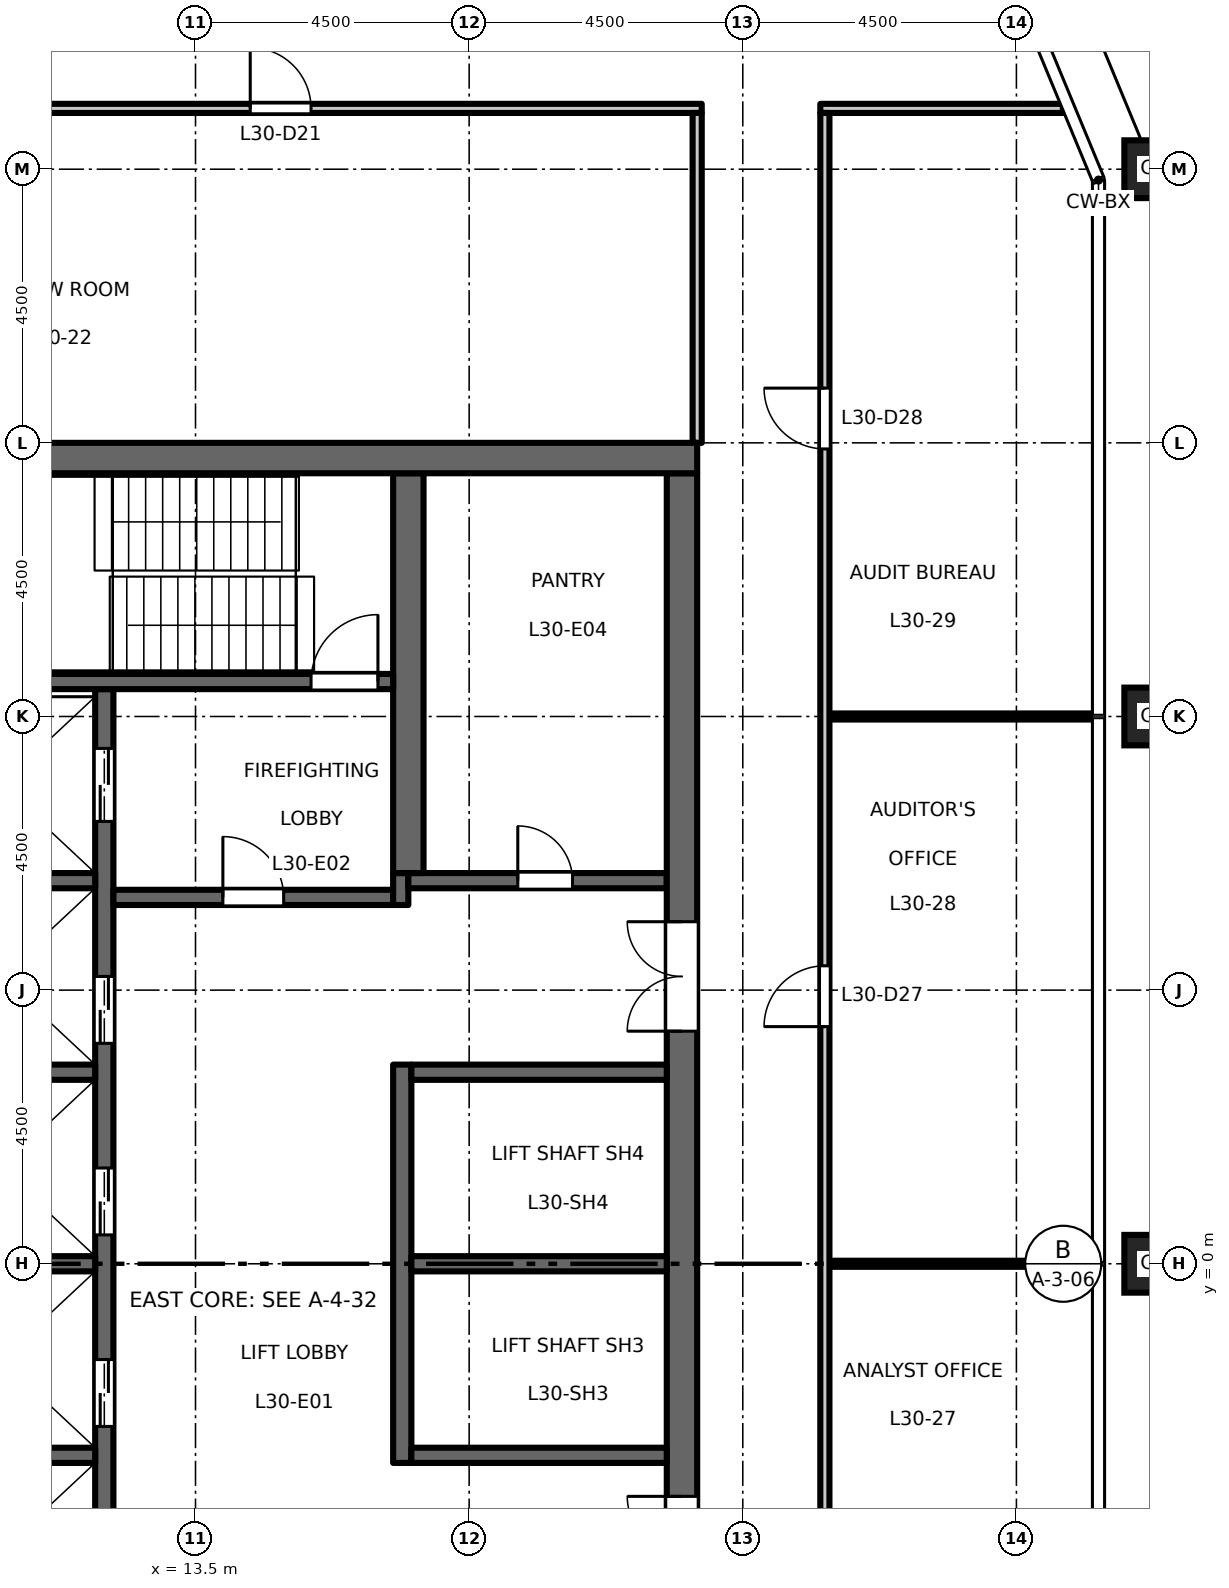
"""IFC4 building model, lengths in metres.
Left out: names, types, materials, properties, quantities, classifications, styles, units other than length and angle.
Written with IfcOpenShell. Run it as: python <this file> out.ifc"""

import sys

from ifc_helpers import new_model, si_unit, direction, frame, frame_2d, origin, origin_2d, place, context, subcontext, project, spatial, rectangle, hollow_rectangle, extrude, element, fill, save


model = new_model("IFC4")
c1 = context("Model", 3, precision=1e-05, world=origin(), true_north=direction((0.0, 1.0)))
c2 = subcontext(c1, "Body", "Model", "MODEL_VIEW")
j1 = project(units=[si_unit("LENGTHUNIT", "METRE"), si_unit("PLANEANGLEUNIT", "RADIAN")], contexts=[c1])
p1 = place(None, origin())
s1 = spatial("IfcSite", under=j1, at=p1, CompositionType="ELEMENT")
p2 = place(p1, origin())
s2 = spatial("IfcBuilding", under=s1, at=p2, CompositionType="ELEMENT")
p3 = place(p2, frame((0.0, 0.0, 140.7)))
s3 = spatial("IfcBuildingStorey", under=s2, at=p3, CompositionType="ELEMENT", Elevation=140.7)
for number, where, z_axis, x_axis in (
    (1, (29.25, 0.0, 0.0), (0.0, 0.0, 1.0), (1.0, 0.0, 0.0)),
    (2, (29.25, 9.0, 0.0), (0.0, 0.0, 1.0), (1.0, 0.0, 0.0)),
    (3, (29.25, 18.0, 0.0), (0.0, 0.0, 1.0), (1.0, 0.0, 0.0)),
):
    element("IfcColumn", number, at=place(p3, frame(where, z_axis=z_axis, x_axis=x_axis)), inside=s3, PredefinedType="COLUMN", context=c2, shape_type="SweptSolid", body=[
        extrude(hollow_rectangle(XDim=0.95, YDim=0.95, WallThickness=0.055, at=origin_2d()), origin(), (0.0, 0.0, 1.0), 4.5),
    ])
p4 = place(p3, frame((12.0, -9.45, 0.0), z_axis=(0.0, 0.0, 1.0), x_axis=(0.0, 1.0, 0.0)))
e4 = element("IfcWall", 4, at=p4, inside=s3, PredefinedType="SHEAR", context=c2, shape_type="SweptSolid", body=[
    extrude(rectangle(XDim=18.9, YDim=0.3, at=frame_2d((9.45, 0.0))), origin(), (0.0, 0.0, 1.0), 4.35),
])
p5 = place(p4, frame((3.625, 0.0, 0.0)))
e5 = element("IfcOpeningElement", 5, at=p5, cuts=e4, PredefinedType="OPENING", context=c2, shape_type="SweptSolid", body=[
    extrude(rectangle(XDim=1.1, YDim=2.1, at=frame_2d((0.55, 1.05))), frame((0.0, 0.16, 0.0), z_axis=(0.0, -1.0, 0.0), x_axis=(1.0, 0.0, 0.0)), (0.0, 0.0, 1.0), 0.32),
])
p6 = place(p4, frame((6.775, 0.0, 0.0)))
e6 = element("IfcOpeningElement", 6, at=p6, cuts=e4, PredefinedType="OPENING", context=c2, shape_type="SweptSolid", body=[
    extrude(rectangle(XDim=1.1, YDim=2.1, at=frame_2d((0.55, 1.05))), frame((0.0, 0.16, 0.0), z_axis=(0.0, -1.0, 0.0), x_axis=(1.0, 0.0, 0.0)), (0.0, 0.0, 1.0), 0.32),
])
p7 = place(p4, frame((9.925, 0.0, 0.0)))
e7 = element("IfcOpeningElement", 7, at=p7, cuts=e4, PredefinedType="OPENING", context=c2, shape_type="SweptSolid", body=[
    extrude(rectangle(XDim=1.1, YDim=2.1, at=frame_2d((0.55, 1.05))), frame((0.0, 0.16, 0.0), z_axis=(0.0, -1.0, 0.0), x_axis=(1.0, 0.0, 0.0)), (0.0, 0.0, 1.0), 0.32),
])
p8 = place(p4, frame((13.075, 0.0, 0.0)))
e8 = element("IfcOpeningElement", 8, at=p8, cuts=e4, PredefinedType="OPENING", context=c2, shape_type="SweptSolid", body=[
    extrude(rectangle(XDim=1.1, YDim=2.1, at=frame_2d((0.55, 1.05))), frame((0.0, 0.16, 0.0), z_axis=(0.0, -1.0, 0.0), x_axis=(1.0, 0.0, 0.0)), (0.0, 0.0, 1.0), 0.32),
])
p9 = place(p4, frame((16.725, 0.0, 0.0)))
e9 = element("IfcOpeningElement", 9, at=p9, cuts=e4, PredefinedType="OPENING", context=c2, shape_type="SweptSolid", body=[
    extrude(rectangle(XDim=1.2, YDim=2.1, at=frame_2d((0.6, 1.05))), frame((0.0, 0.16, 0.0), z_axis=(0.0, -1.0, 0.0), x_axis=(1.0, 0.0, 0.0)), (0.0, 0.0, 1.0), 0.32),
])
p10 = place(p4, frame((0.975, 0.0, 0.0)))
e10 = element("IfcOpeningElement", 10, at=p10, cuts=e4, PredefinedType="OPENING", context=c2, shape_type="SweptSolid", body=[
    extrude(rectangle(XDim=1.2, YDim=2.1, at=frame_2d((0.6, 1.05))), frame((0.0, 0.16, 0.0), z_axis=(0.0, -1.0, 0.0), x_axis=(1.0, 0.0, 0.0)), (0.0, 0.0, 1.0), 0.32),
])
p11 = place(p3, frame((12.15, 6.025, 0.0), z_axis=(0.0, 0.0, 1.0), x_axis=(1.0, 0.0, 0.0)))
e11 = element("IfcWall", 11, at=p11, inside=s3, PredefinedType="SHEAR", context=c2, shape_type="SweptSolid", body=[
    extrude(rectangle(XDim=4.6, YDim=0.25, at=frame_2d((2.3, 0.0))), origin(), (0.0, 0.0, 1.0), 4.35),
])
p12 = place(p11, frame((1.8, 0.0, 0.0)))
e12 = element("IfcOpeningElement", 12, at=p12, cuts=e11, PredefinedType="OPENING", context=c2, shape_type="SweptSolid", body=[
    extrude(rectangle(XDim=1.0, YDim=2.1, at=frame_2d((0.5, 1.05))), frame((0.0, 0.135, 0.0), z_axis=(0.0, -1.0, 0.0), x_axis=(1.0, 0.0, 0.0)), (0.0, 0.0, 1.0), 0.27),
])
p13 = place(p3, frame((16.875, 5.9, 0.0), z_axis=(0.0, 0.0, 1.0), x_axis=(0.0, 1.0, 0.0)))
e13 = element("IfcWall", 13, at=p13, inside=s3, PredefinedType="SHEAR", context=c2, shape_type="SweptSolid", body=[
    extrude(rectangle(XDim=0.525, YDim=0.25, at=frame_2d((0.263, 0.0))), origin(), (0.0, 0.0, 1.0), 4.35),
])
p14 = place(p3, frame((17.0, 6.3, 0.0), z_axis=(0.0, 0.0, 1.0), x_axis=(1.0, 0.0, 0.0)))
e14 = element("IfcWall", 14, at=p14, inside=s3, PredefinedType="SHEAR", context=c2, shape_type="SweptSolid", body=[
    extrude(rectangle(XDim=4.25, YDim=0.25, at=frame_2d((2.125, 0.0))), origin(), (0.0, 0.0, 1.0), 4.35),
])
p15 = place(p14, frame((1.8, 0.0, 0.0)))
e15 = element("IfcOpeningElement", 15, at=p15, cuts=e14, PredefinedType="OPENING", context=c2, shape_type="SweptSolid", body=[
    extrude(rectangle(XDim=0.9, YDim=2.1, at=frame_2d((0.45, 1.05))), frame((0.0, 0.135, 0.0), z_axis=(0.0, -1.0, 0.0), x_axis=(1.0, 0.0, 0.0)), (0.0, 0.0, 1.0), 0.27),
])
p16 = place(p3, frame((21.5, -13.0, 0.0), z_axis=(0.0, 0.0, 1.0), x_axis=(0.0, 1.0, 0.0)))
e16 = element("IfcWall", 16, at=p16, inside=s3, PredefinedType="SHEAR", context=c2, shape_type="SweptSolid", body=[
    extrude(rectangle(XDim=26.0, YDim=0.5, at=frame_2d((13.0, 0.0))), origin(), (0.0, 0.0, 1.0), 4.35),
])
p17 = place(p16, frame((16.825, 0.0, 0.0)))
e17 = element("IfcOpeningElement", 17, at=p17, cuts=e16, PredefinedType="OPENING", context=c2, shape_type="SweptSolid", body=[
    extrude(rectangle(XDim=1.8, YDim=2.1, at=frame_2d((0.9, 1.05))), frame((0.0, 0.26, 0.0), z_axis=(0.0, -1.0, 0.0), x_axis=(1.0, 0.0, 0.0)), (0.0, 0.0, 1.0), 0.52),
])
p18 = place(p16, frame((7.375, 0.0, 0.0)))
e18 = element("IfcOpeningElement", 18, at=p18, cuts=e16, PredefinedType="OPENING", context=c2, shape_type="SweptSolid", body=[
    extrude(rectangle(XDim=1.8, YDim=2.1, at=frame_2d((0.9, 1.05))), frame((0.0, 0.26, 0.0), z_axis=(0.0, -1.0, 0.0), x_axis=(1.0, 0.0, 0.0)), (0.0, 0.0, 1.0), 0.52),
])
p19 = place(p16, frame((2.65, 0.0, 0.0)))
e19 = element("IfcOpeningElement", 19, at=p19, cuts=e16, PredefinedType="OPENING", context=c2, shape_type="SweptSolid", body=[
    extrude(rectangle(XDim=0.9, YDim=2.1, at=frame_2d((0.45, 1.05))), frame((0.0, 0.26, 0.0), z_axis=(0.0, -1.0, 0.0), x_axis=(1.0, 0.0, 0.0)), (0.0, 0.0, 1.0), 0.52),
])
p20 = place(p3, frame((16.9, -3.275, 0.0), z_axis=(0.0, 0.0, 1.0), x_axis=(0.0, 1.0, 0.0)))
e20 = element("IfcWall", 20, at=p20, inside=s3, PredefinedType="SHEAR", context=c2, shape_type="SweptSolid", body=[
    extrude(rectangle(XDim=6.55, YDim=0.3, at=frame_2d((3.275, 0.0))), origin(), (0.0, 0.0, 1.0), 4.35),
])
for number, where, z_axis, x_axis in (
    (21, (17.05, 0.0, 0.0), (0.0, 0.0, 1.0), (1.0, 0.0, 0.0)),
    (22, (17.05, 3.15, 0.0), (0.0, 0.0, 1.0), (1.0, 0.0, 0.0)),
    (23, (17.05, -3.15, 0.0), (0.0, 0.0, 1.0), (1.0, 0.0, 0.0)),
):
    element("IfcWall", number, at=place(p3, frame(where, z_axis=z_axis, x_axis=x_axis)), inside=s3, PredefinedType="SHEAR", context=c2, shape_type="SweptSolid", body=[
        extrude(rectangle(XDim=4.2, YDim=0.25, at=frame_2d((2.1, 0.0))), origin(), (0.0, 0.0, 1.0), 4.35),
    ])
p21 = place(p3, frame((17.0, 6.425, 0.0), z_axis=(0.0, 0.0, 1.0), x_axis=(0.0, 1.0, 0.0)))
e24 = element("IfcWall", 24, at=p21, inside=s3, PredefinedType="SHEAR", context=c2, shape_type="SweptSolid", body=[
    extrude(rectangle(XDim=6.575, YDim=0.5, at=frame_2d((3.288, 0.0))), origin(), (0.0, 0.0, 1.0), 4.35),
])
for number, where, z_axis, x_axis in (
    (25, (8.75, 0.0, 0.0), (0.0, 0.0, 1.0), (1.0, 0.0, 0.0)),
    (26, (8.75, 3.15, 0.0), (0.0, 0.0, 1.0), (1.0, 0.0, 0.0)),
    (27, (8.75, 6.3, 0.0), (0.0, 0.0, 1.0), (1.0, 0.0, 0.0)),
    (28, (8.75, -3.15, 0.0), (0.0, 0.0, 1.0), (1.0, 0.0, 0.0)),
):
    element("IfcWall", number, at=place(p3, frame(where, z_axis=z_axis, x_axis=x_axis)), inside=s3, PredefinedType="SHEAR", context=c2, shape_type="SweptSolid", body=[
        extrude(rectangle(XDim=3.1, YDim=0.25, at=frame_2d((1.55, 0.0))), origin(), (0.0, 0.0, 1.0), 4.35),
    ])
p22 = place(p3, frame((8.75, 9.575, 0.0), z_axis=(0.0, 0.0, 1.0), x_axis=(1.0, 0.0, 0.0)))
e29 = element("IfcWall", 29, at=p22, inside=s3, PredefinedType="SHEAR", context=c2, shape_type="SweptSolid", body=[
    extrude(rectangle(XDim=8.0, YDim=0.25, at=frame_2d((4.0, 0.0))), origin(), (0.0, 0.0, 1.0), 4.35),
])
p23 = place(p22, frame((6.65, 0.0, 0.0)))
e30 = element("IfcOpeningElement", 30, at=p23, cuts=e29, PredefinedType="OPENING", context=c2, shape_type="SweptSolid", body=[
    extrude(rectangle(XDim=1.1, YDim=2.1, at=frame_2d((0.55, 1.05))), frame((0.0, 0.135, 0.0), z_axis=(0.0, -1.0, 0.0), x_axis=(1.0, 0.0, 0.0)), (0.0, 0.0, 1.0), 0.27),
])
p24 = place(p3, frame((8.25, 13.25, 0.0), z_axis=(0.0, 0.0, 1.0), x_axis=(1.0, 0.0, 0.0)))
e31 = element("IfcWall", 31, at=p24, inside=s3, PredefinedType="SHEAR", context=c2, shape_type="SweptSolid", body=[
    extrude(rectangle(XDim=13.5, YDim=0.5, at=frame_2d((6.75, 0.0))), origin(), (0.0, 0.0, 1.0), 4.35),
])
for number, where, z_axis, x_axis in (
    (32, (23.925, 0.0, 0.0), (0.0, 0.0, 1.0), (1.0, 0.0, 0.0)),
    (33, (23.925, 9.0, 0.0), (0.0, 0.0, 1.0), (1.0, 0.0, 0.0)),
):
    element("IfcWall", number, at=place(p3, frame(where, z_axis=z_axis, x_axis=x_axis)), inside=s3, PredefinedType="PARTITIONING", context=c2, shape_type="SweptSolid", body=[
        extrude(rectangle(XDim=4.335, YDim=0.1, at=frame_2d((2.167, 0.0))), origin(), (0.0, 0.0, 1.0), 4.35),
    ])
p25 = place(p3, frame((-21.825, 19.0, 0.0), z_axis=(0.0, 0.0, 1.0), x_axis=(1.0, 0.0, 0.0)))
e34 = element("IfcWall", 34, at=p25, inside=s3, PredefinedType="PARTITIONING", context=c2, shape_type="SweptSolid", body=[
    extrude(rectangle(XDim=43.65, YDim=0.15, at=frame_2d((21.825, 0.0))), origin(), (0.0, 0.0, 1.0), 4.35),
])
p26 = place(p25, frame((17.225, 0.0, 0.0)))
e35 = element("IfcOpeningElement", 35, at=p26, cuts=e34, PredefinedType="OPENING", context=c2, shape_type="SweptSolid", body=[
    extrude(rectangle(XDim=1.0, YDim=2.1, at=frame_2d((0.5, 1.05))), frame((0.0, 0.085, 0.0), z_axis=(0.0, -1.0, 0.0), x_axis=(1.0, 0.0, 0.0)), (0.0, 0.0, 1.0), 0.17),
])
p27 = place(p25, frame((25.475, 0.0, 0.0)))
e36 = element("IfcOpeningElement", 36, at=p27, cuts=e34, PredefinedType="OPENING", context=c2, shape_type="SweptSolid", body=[
    extrude(rectangle(XDim=1.0, YDim=2.1, at=frame_2d((0.5, 1.05))), frame((0.0, 0.085, 0.0), z_axis=(0.0, -1.0, 0.0), x_axis=(1.0, 0.0, 0.0)), (0.0, 0.0, 1.0), 0.17),
])
p28 = place(p25, frame((6.225, 0.0, 0.0)))
e37 = element("IfcOpeningElement", 37, at=p28, cuts=e34, PredefinedType="OPENING", context=c2, shape_type="SweptSolid", body=[
    extrude(rectangle(XDim=1.0, YDim=2.1, at=frame_2d((0.5, 1.05))), frame((0.0, 0.085, 0.0), z_axis=(0.0, -1.0, 0.0), x_axis=(1.0, 0.0, 0.0)), (0.0, 0.0, 1.0), 0.17),
])
p29 = place(p25, frame((36.225, 0.0, 0.0)))
e38 = element("IfcOpeningElement", 38, at=p29, cuts=e34, PredefinedType="OPENING", context=c2, shape_type="SweptSolid", body=[
    extrude(rectangle(XDim=1.0, YDim=2.1, at=frame_2d((0.5, 1.05))), frame((0.0, 0.085, 0.0), z_axis=(0.0, -1.0, 0.0), x_axis=(1.0, 0.0, 0.0)), (0.0, 0.0, 1.0), 0.17),
])
p30 = place(p3, frame((23.775, 19.0, 0.0), z_axis=(0.0, 0.0, 1.0), x_axis=(1.0, 0.0, 0.0)))
e39 = element("IfcWall", 39, at=p30, inside=s3, PredefinedType="PARTITIONING", context=c2, shape_type="SweptSolid", body=[
    extrude(rectangle(XDim=3.989, YDim=0.15, at=frame_2d((1.995, 0.0))), origin(), (0.0, 0.0, 1.0), 4.35),
])
p31 = place(p3, frame((21.75, 13.5, 0.0), z_axis=(0.0, 0.0, 1.0), x_axis=(0.0, 1.0, 0.0)))
e40 = element("IfcWall", 40, at=p31, inside=s3, PredefinedType="PARTITIONING", context=c2, shape_type="SweptSolid", body=[
    extrude(rectangle(XDim=5.425, YDim=0.15, at=frame_2d((2.712, 0.0))), origin(), (0.0, 0.0, 1.0), 4.35),
])
p32 = place(p3, frame((23.85, -18.925, 0.0), z_axis=(0.0, 0.0, 1.0), x_axis=(0.0, 1.0, 0.0)))
e41 = element("IfcWall", 41, at=p32, inside=s3, PredefinedType="PARTITIONING", context=c2, shape_type="SweptSolid", body=[
    extrude(rectangle(XDim=37.85, YDim=0.15, at=frame_2d((18.925, 0.0))), origin(), (0.0, 0.0, 1.0), 4.35),
])
p33 = place(p32, frame((4.325, 0.0, 0.0)))
e42 = element("IfcOpeningElement", 42, at=p33, cuts=e41, PredefinedType="OPENING", context=c2, shape_type="SweptSolid", body=[
    extrude(rectangle(XDim=1.0, YDim=2.1, at=frame_2d((0.5, 1.05))), frame((0.0, 0.085, 0.0), z_axis=(0.0, -1.0, 0.0), x_axis=(1.0, 0.0, 0.0)), (0.0, 0.0, 1.0), 0.17),
])
p34 = place(p32, frame((13.825, 0.0, 0.0)))
e43 = element("IfcOpeningElement", 43, at=p34, cuts=e41, PredefinedType="OPENING", context=c2, shape_type="SweptSolid", body=[
    extrude(rectangle(XDim=1.0, YDim=2.1, at=frame_2d((0.5, 1.05))), frame((0.0, 0.085, 0.0), z_axis=(0.0, -1.0, 0.0), x_axis=(1.0, 0.0, 0.0)), (0.0, 0.0, 1.0), 0.17),
])
p35 = place(p32, frame((22.825, 0.0, 0.0)))
e44 = element("IfcOpeningElement", 44, at=p35, cuts=e41, PredefinedType="OPENING", context=c2, shape_type="SweptSolid", body=[
    extrude(rectangle(XDim=1.0, YDim=2.1, at=frame_2d((0.5, 1.05))), frame((0.0, 0.085, 0.0), z_axis=(0.0, -1.0, 0.0), x_axis=(1.0, 0.0, 0.0)), (0.0, 0.0, 1.0), 0.17),
])
p36 = place(p32, frame((32.325, 0.0, 0.0)))
e45 = element("IfcOpeningElement", 45, at=p36, cuts=e41, PredefinedType="OPENING", context=c2, shape_type="SweptSolid", body=[
    extrude(rectangle(XDim=1.0, YDim=2.1, at=frame_2d((0.5, 1.05))), frame((0.0, 0.085, 0.0), z_axis=(0.0, -1.0, 0.0), x_axis=(1.0, 0.0, 0.0)), (0.0, 0.0, 1.0), 0.17),
])
p37 = place(p12, origin())
e46 = element("IfcDoor", 46, at=p37, inside=s3, OperationType="SINGLE_SWING_RIGHT", PredefinedType="DOOR", context=c2, shape_type="SweptSolid", body=[
    extrude(rectangle(XDim=1.0, YDim=2.1, at=frame_2d((0.5, 1.05))), frame((0.0, 0.025, 0.0), z_axis=(0.0, -1.0, 0.0), x_axis=(1.0, 0.0, 0.0)), (0.0, 0.0, 1.0), 0.05),
])
fill(e12, e46)
p38 = place(p23, origin())
e47 = element("IfcDoor", 47, at=p38, inside=s3, OperationType="SINGLE_SWING_LEFT", PredefinedType="DOOR", context=c2, shape_type="SweptSolid", body=[
    extrude(rectangle(XDim=1.1, YDim=2.1, at=frame_2d((0.55, 1.05))), frame((0.0, 0.025, 0.0), z_axis=(0.0, -1.0, 0.0), x_axis=(1.0, 0.0, 0.0)), (0.0, 0.0, 1.0), 0.05),
])
fill(e30, e47)
p39 = place(p17, origin())
e48 = element("IfcDoor", 48, at=p39, inside=s3, OperationType="DOUBLE_DOOR_DOUBLE_SWING", PredefinedType="DOOR", context=c2, shape_type="SweptSolid", body=[
    extrude(rectangle(XDim=1.8, YDim=2.1, at=frame_2d((0.9, 1.05))), frame((0.0, 0.025, 0.0), z_axis=(0.0, -1.0, 0.0), x_axis=(1.0, 0.0, 0.0)), (0.0, 0.0, 1.0), 0.05),
])
fill(e17, e48)
p40 = place(p18, origin())
e49 = element("IfcDoor", 49, at=p40, inside=s3, OperationType="DOUBLE_DOOR_DOUBLE_SWING", PredefinedType="DOOR", context=c2, shape_type="SweptSolid", body=[
    extrude(rectangle(XDim=1.8, YDim=2.1, at=frame_2d((0.9, 1.05))), frame((0.0, 0.025, 0.0), z_axis=(0.0, -1.0, 0.0), x_axis=(1.0, 0.0, 0.0)), (0.0, 0.0, 1.0), 0.05),
])
fill(e18, e49)
p41 = place(p6, origin())
e50 = element("IfcDoor", 50, at=p41, inside=s3, OperationType="DOUBLE_DOOR_SLIDING", PredefinedType="DOOR", context=c2, shape_type="SweptSolid", body=[
    extrude(rectangle(XDim=1.1, YDim=2.1, at=frame_2d((0.55, 1.05))), frame((0.0, 0.025, 0.0), z_axis=(0.0, -1.0, 0.0), x_axis=(1.0, 0.0, 0.0)), (0.0, 0.0, 1.0), 0.05),
])
fill(e6, e50)
p42 = place(p7, origin())
e51 = element("IfcDoor", 51, at=p42, inside=s3, OperationType="DOUBLE_DOOR_SLIDING", PredefinedType="DOOR", context=c2, shape_type="SweptSolid", body=[
    extrude(rectangle(XDim=1.1, YDim=2.1, at=frame_2d((0.55, 1.05))), frame((0.0, 0.025, 0.0), z_axis=(0.0, -1.0, 0.0), x_axis=(1.0, 0.0, 0.0)), (0.0, 0.0, 1.0), 0.05),
])
fill(e7, e51)
p43 = place(p8, origin())
e52 = element("IfcDoor", 52, at=p43, inside=s3, OperationType="DOUBLE_DOOR_SLIDING", PredefinedType="DOOR", context=c2, shape_type="SweptSolid", body=[
    extrude(rectangle(XDim=1.1, YDim=2.1, at=frame_2d((0.55, 1.05))), frame((0.0, 0.025, 0.0), z_axis=(0.0, -1.0, 0.0), x_axis=(1.0, 0.0, 0.0)), (0.0, 0.0, 1.0), 0.05),
])
fill(e8, e52)
p44 = place(p9, origin())
e53 = element("IfcDoor", 53, at=p44, inside=s3, OperationType="DOUBLE_DOOR_SLIDING", PredefinedType="DOOR", context=c2, shape_type="SweptSolid", body=[
    extrude(rectangle(XDim=1.2, YDim=2.1, at=frame_2d((0.6, 1.05))), frame((0.0, 0.025, 0.0), z_axis=(0.0, -1.0, 0.0), x_axis=(1.0, 0.0, 0.0)), (0.0, 0.0, 1.0), 0.05),
])
fill(e9, e53)
p45 = place(p15, origin())
e54 = element("IfcDoor", 54, at=p45, inside=s3, OperationType="SINGLE_SWING_RIGHT", PredefinedType="DOOR", context=c2, shape_type="SweptSolid", body=[
    extrude(rectangle(XDim=0.9, YDim=2.1, at=frame_2d((0.45, 1.05))), frame((0.0, 0.025, 0.0), z_axis=(0.0, -1.0, 0.0), x_axis=(1.0, 0.0, 0.0)), (0.0, 0.0, 1.0), 0.05),
])
fill(e15, e54)
p46 = place(p29, origin())
e55 = element("IfcDoor", 55, at=p46, inside=s3, OperationType="SINGLE_SWING_LEFT", PredefinedType="DOOR", context=c2, shape_type="SweptSolid", body=[
    extrude(rectangle(XDim=1.0, YDim=2.1, at=frame_2d((0.5, 1.05))), frame((0.0, 0.025, 0.0), z_axis=(0.0, -1.0, 0.0), x_axis=(1.0, 0.0, 0.0)), (0.0, 0.0, 1.0), 0.05),
])
fill(e38, e55)
p47 = place(p35, origin())
e56 = element("IfcDoor", 56, at=p47, inside=s3, OperationType="SINGLE_SWING_LEFT", PredefinedType="DOOR", context=c2, shape_type="SweptSolid", body=[
    extrude(rectangle(XDim=1.0, YDim=2.1, at=frame_2d((0.5, 1.05))), frame((0.0, 0.025, 0.0), z_axis=(0.0, -1.0, 0.0), x_axis=(1.0, 0.0, 0.0)), (0.0, 0.0, 1.0), 0.05),
])
fill(e44, e56)
p48 = place(p36, origin())
e57 = element("IfcDoor", 57, at=p48, inside=s3, OperationType="SINGLE_SWING_RIGHT", PredefinedType="DOOR", context=c2, shape_type="SweptSolid", body=[
    extrude(rectangle(XDim=1.0, YDim=2.1, at=frame_2d((0.5, 1.05))), frame((0.0, 0.025, 0.0), z_axis=(0.0, -1.0, 0.0), x_axis=(1.0, 0.0, 0.0)), (0.0, 0.0, 1.0), 0.05),
])
fill(e45, e57)
save(model, sys.argv[1])
